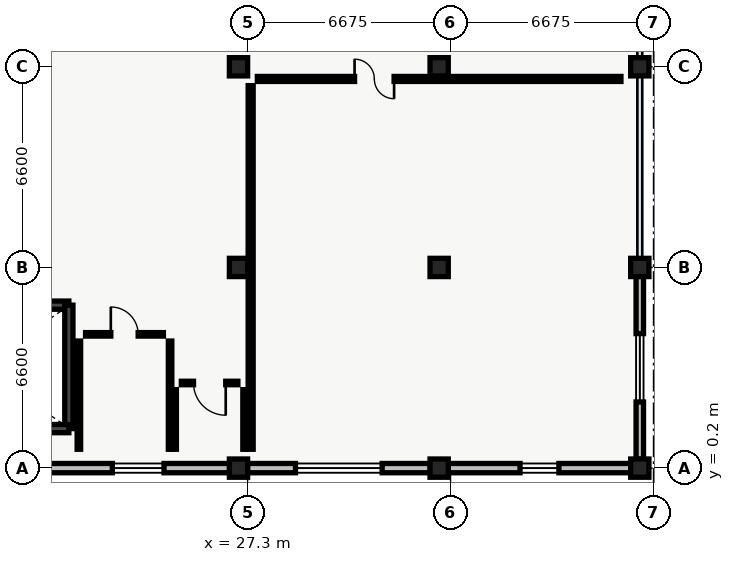
"""IFC4 building model, lengths in metres.
Left out: names, types, materials, properties, quantities, classifications, styles, units other than length and angle.
Written with IfcOpenShell. Run it as: python <this file> out.ifc"""

import sys

from ifc_helpers import new_model, si_unit, direction, frame, frame_2d, origin, origin_2d, place, context, subcontext, project, spatial, rectangle, extrude, element, fill, save


model = new_model("IFC4")
c1 = context("Model", 3, precision=1e-05, world=origin(), true_north=direction((0.0, 1.0)))
c2 = subcontext(c1, "Body", "Model", "MODEL_VIEW")
j1 = project(units=[si_unit("LENGTHUNIT", "METRE"), si_unit("PLANEANGLEUNIT", "RADIAN")], contexts=[c1])
p1 = place(None, origin())
s1 = spatial("IfcSite", under=j1, at=p1, CompositionType="ELEMENT")
p2 = place(p1, origin())
s2 = spatial("IfcBuilding", under=s1, at=p2, CompositionType="ELEMENT")
p3 = place(p2, frame((0.0, 0.0, 5.1)))
s3 = spatial("IfcBuildingStorey", under=s2, at=p3, CompositionType="ELEMENT", Elevation=5.1)
for number, where, z_axis, x_axis in (
    (1, (27.0, 0.2, 0.0), (0.0, 0.0, 1.0), (1.0, 0.0, 0.0)),
    (2, (27.0, 6.8, 0.0), (0.0, 0.0, 1.0), (1.0, 0.0, 0.0)),
    (3, (27.0, 13.4, 0.0), (0.0, 0.0, 1.0), (1.0, 0.0, 0.0)),
    (4, (33.6, 0.2, 0.0), (0.0, 0.0, 1.0), (1.0, 0.0, 0.0)),
    (5, (33.6, 6.8, 0.0), (0.0, 0.0, 1.0), (1.0, 0.0, 0.0)),
    (6, (33.6, 13.4, 0.0), (0.0, 0.0, 1.0), (1.0, 0.0, 0.0)),
    (7, (40.2, 0.2, 0.0), (0.0, 0.0, 1.0), (1.0, 0.0, 0.0)),
    (8, (40.2, 6.8, 0.0), (0.0, 0.0, 1.0), (1.0, 0.0, 0.0)),
    (9, (40.2, 13.4, 0.0), (0.0, 0.0, 1.0), (1.0, 0.0, 0.0)),
):
    element("IfcColumn", number, at=place(p3, frame(where, z_axis=z_axis, x_axis=x_axis)), inside=s3, PredefinedType="COLUMN", context=c2, shape_type="SweptSolid", body=[
        extrude(rectangle(XDim=0.6, YDim=0.6, at=origin_2d()), origin(), (0.0, 0.0, 1.0), 4.3),
    ])
p4 = place(p3, frame((40.2, 6.505, 0.0), z_axis=(0.0, 0.0, 1.0), x_axis=(0.0, -1.0, 0.0)))
e10 = element("IfcWall", 10, at=p4, inside=s3, PredefinedType="STANDARD", context=c2, shape_type="SweptSolid", body=[
    extrude(rectangle(XDim=6.01, YDim=0.245, at=frame_2d((3.005, 0.0))), origin(), (0.0, 0.0, 1.0), 3.785),
])
p5 = place(p4, frame((1.88, 0.0, 0.95)))
e11 = element("IfcOpeningElement", 11, at=p5, cuts=e10, PredefinedType="OPENING", context=c2, shape_type="SweptSolid", body=[
    extrude(rectangle(XDim=2.25, YDim=1.55, at=frame_2d((1.125, 0.775))), frame((0.0, 0.123, 0.0), z_axis=(0.0, -1.0, 0.0), x_axis=(1.0, 0.0, 0.0)), (0.0, 0.0, 1.0), 0.245),
])
p6 = place(p3, frame((39.905, 0.2, 0.0), z_axis=(0.0, 0.0, 1.0), x_axis=(-1.0, 0.0, 0.0)))
e12 = element("IfcWall", 12, at=p6, inside=s3, PredefinedType="STANDARD", context=c2, shape_type="SweptSolid", body=[
    extrude(rectangle(XDim=6.01, YDim=0.305, at=frame_2d((3.005, 0.0))), origin(), (0.0, 0.0, 1.0), 3.785),
])
p7 = place(p6, frame((2.365, 0.0, 0.95)))
e13 = element("IfcOpeningElement", 13, at=p7, cuts=e12, PredefinedType="OPENING", context=c2, shape_type="SweptSolid", body=[
    extrude(rectangle(XDim=1.28, YDim=1.42, at=frame_2d((0.64, 0.71))), frame((0.0, 0.152, 0.0), z_axis=(0.0, -1.0, 0.0), x_axis=(1.0, 0.0, 0.0)), (0.0, 0.0, 1.0), 0.305),
])
p8 = place(p3, frame((33.305, 0.2, 0.0), z_axis=(0.0, 0.0, 1.0), x_axis=(-1.0, 0.0, 0.0)))
e14 = element("IfcWall", 14, at=p8, inside=s3, PredefinedType="STANDARD", context=c2, shape_type="SweptSolid", body=[
    extrude(rectangle(XDim=6.01, YDim=0.305, at=frame_2d((3.005, 0.0))), origin(), (0.0, 0.0, 1.0), 3.785),
])
p9 = place(p8, frame((1.58, 0.0, 0.95)))
e15 = element("IfcOpeningElement", 15, at=p9, cuts=e14, PredefinedType="OPENING", context=c2, shape_type="SweptSolid", body=[
    extrude(rectangle(XDim=2.85, YDim=1.5, at=frame_2d((1.425, 0.75))), frame((0.0, 0.152, 0.0), z_axis=(0.0, -1.0, 0.0), x_axis=(1.0, 0.0, 0.0)), (0.0, 0.0, 1.0), 0.305),
])
p10 = place(p3, frame((26.705, 0.2, 0.0), z_axis=(0.0, 0.0, 1.0), x_axis=(-1.0, 0.0, 0.0)))
e16 = element("IfcWall", 16, at=p10, inside=s3, PredefinedType="STANDARD", context=c2, shape_type="SweptSolid", body=[
    extrude(rectangle(XDim=6.01, YDim=0.305, at=frame_2d((3.005, 0.0))), origin(), (0.0, 0.0, 1.0), 3.785),
])
p11 = place(p10, frame((2.155, 0.0, 0.95)))
e17 = element("IfcOpeningElement", 17, at=p11, cuts=e16, PredefinedType="OPENING", context=c2, shape_type="SweptSolid", body=[
    extrude(rectangle(XDim=1.7, YDim=1.55, at=frame_2d((0.85, 0.775))), frame((0.0, 0.152, 0.0), z_axis=(0.0, -1.0, 0.0), x_axis=(1.0, 0.0, 0.0)), (0.0, 0.0, 1.0), 0.305),
])
p12 = place(p3, frame((13.95, 5.56, 0.0), z_axis=(0.0, 0.0, 1.0), x_axis=(1.0, 0.0, 0.0)))
e18 = element("IfcWall", 18, at=p12, inside=s3, PredefinedType="SHEAR", context=c2, shape_type="SweptSolid", body=[
    extrude(rectangle(XDim=7.47, YDim=0.27, at=frame_2d((3.735, 0.0))), origin(), (0.0, 0.0, 1.0), 4.28),
])
p13 = place(p12, frame((0.18, 0.0, 0.0)))
e19 = element("IfcOpeningElement", 19, at=p13, cuts=e18, PredefinedType="OPENING", context=c2, shape_type="SweptSolid", body=[
    extrude(rectangle(XDim=1.08, YDim=2.15, at=frame_2d((0.54, 1.075))), frame((0.0, 0.135, 0.0), z_axis=(0.0, -1.0, 0.0), x_axis=(1.0, 0.0, 0.0)), (0.0, 0.0, 1.0), 0.27),
])
p14 = place(p3, frame((21.42, 5.56, 0.0), z_axis=(0.0, 0.0, 1.0), x_axis=(0.0, -1.0, 0.0)))
e20 = element("IfcWall", 20, at=p14, inside=s3, PredefinedType="SHEAR", context=c2, shape_type="SweptSolid", body=[
    extrude(rectangle(XDim=4.06, YDim=0.27, at=frame_2d((2.03, 0.0))), origin(), (0.0, 0.0, 1.0), 4.28),
])
p15 = place(p3, frame((21.42, 1.5, 0.0), z_axis=(0.0, 0.0, 1.0), x_axis=(-1.0, 0.0, 0.0)))
e21 = element("IfcWall", 21, at=p15, inside=s3, PredefinedType="SHEAR", context=c2, shape_type="SweptSolid", body=[
    extrude(rectangle(XDim=7.47, YDim=0.27, at=frame_2d((3.735, 0.0))), origin(), (0.0, 0.0, 1.0), 4.28),
])
p16 = place(p3, frame((24.75, 0.82, 0.0), z_axis=(0.0, 0.0, 1.0), x_axis=(0.0, 1.0, 0.0)))
e22 = element("IfcWall", 22, at=p16, inside=s3, PredefinedType="PARTITIONING", context=c2, shape_type="SweptSolid", body=[
    extrude(rectangle(XDim=3.56, YDim=0.115, at=frame_2d((1.78, 0.0))), origin(), (0.0, 0.0, 1.0), 3.95),
])
p17 = place(p3, frame((24.53, 4.6, 0.0), z_axis=(0.0, 0.0, 1.0), x_axis=(-1.0, 0.0, 0.0)))
e23 = element("IfcWall", 23, at=p17, inside=s3, PredefinedType="PARTITIONING", context=c2, shape_type="SweptSolid", body=[
    extrude(rectangle(XDim=2.56, YDim=0.115, at=frame_2d((1.28, 0.0))), origin(), (0.0, 0.0, 1.0), 3.95),
])
p18 = place(p17, frame((0.83, 0.0, 0.0)))
e24 = element("IfcOpeningElement", 24, at=p18, cuts=e23, PredefinedType="OPENING", context=c2, shape_type="SweptSolid", body=[
    extrude(rectangle(XDim=0.9, YDim=2.1, at=frame_2d((0.45, 1.05))), frame((0.0, 0.058, 0.0), z_axis=(0.0, -1.0, 0.0), x_axis=(1.0, 0.0, 0.0)), (0.0, 0.0, 1.0), 0.115),
])
p19 = place(p3, frame((21.75, 4.38, 0.0), z_axis=(0.0, 0.0, 1.0), x_axis=(0.0, -1.0, 0.0)))
e25 = element("IfcWall", 25, at=p19, inside=s3, PredefinedType="PARTITIONING", context=c2, shape_type="SweptSolid", body=[
    extrude(rectangle(XDim=3.56, YDim=0.115, at=frame_2d((1.78, 0.0))), origin(), (0.0, 0.0, 1.0), 3.95),
])
p20 = place(p3, frame((27.2, 0.82, 0.0), z_axis=(0.0, 0.0, 1.0), x_axis=(0.0, 1.0, 0.0)))
e26 = element("IfcWall", 26, at=p20, inside=s3, PredefinedType="PARTITIONING", context=c2, shape_type="SweptSolid", body=[
    extrude(rectangle(XDim=1.96, YDim=0.115, at=frame_2d((0.98, 0.0))), origin(), (0.0, 0.0, 1.0), 3.635),
])
p21 = place(p3, frame((26.98, 3.0, 0.0), z_axis=(0.0, 0.0, 1.0), x_axis=(-1.0, 0.0, 0.0)))
e27 = element("IfcWall", 27, at=p21, inside=s3, PredefinedType="PARTITIONING", context=c2, shape_type="SweptSolid", body=[
    extrude(rectangle(XDim=1.86, YDim=0.115, at=frame_2d((0.93, 0.0))), origin(), (0.0, 0.0, 1.0), 3.95),
])
p22 = place(p21, frame((0.4, 0.0, 0.0)))
e28 = element("IfcOpeningElement", 28, at=p22, cuts=e27, PredefinedType="OPENING", context=c2, shape_type="SweptSolid", body=[
    extrude(rectangle(XDim=1.06, YDim=2.12, at=frame_2d((0.53, 1.06))), frame((0.0, 0.058, 0.0), z_axis=(0.0, -1.0, 0.0), x_axis=(1.0, 0.0, 0.0)), (0.0, 0.0, 1.0), 0.115),
])
p23 = place(p3, frame((24.9, 2.78, 0.0), z_axis=(0.0, 0.0, 1.0), x_axis=(0.0, -1.0, 0.0)))
e29 = element("IfcWall", 29, at=p23, inside=s3, PredefinedType="PARTITIONING", context=c2, shape_type="SweptSolid", body=[
    extrude(rectangle(XDim=1.96, YDim=0.115, at=frame_2d((0.98, 0.0))), origin(), (0.0, 0.0, 1.0), 3.95),
])
p24 = place(p3, frame((39.58, 13.0, 0.0), z_axis=(0.0, 0.0, 1.0), x_axis=(-1.0, 0.0, 0.0)))
e30 = element("IfcWall", 30, at=p24, inside=s3, PredefinedType="PARTITIONING", context=c2, shape_type="SweptSolid", body=[
    extrude(rectangle(XDim=11.96, YDim=0.165, at=frame_2d((5.98, 0.0))), origin(), (0.0, 0.0, 1.0), 3.95),
])
p25 = place(p24, frame((7.462, 0.0, 0.0)))
e31 = element("IfcOpeningElement", 31, at=p25, cuts=e30, PredefinedType="OPENING", context=c2, shape_type="SweptSolid", body=[
    extrude(rectangle(XDim=1.3, YDim=2.18, at=frame_2d((0.65, 1.09))), frame((0.0, 0.083, 0.0), z_axis=(0.0, -1.0, 0.0), x_axis=(1.0, 0.0, 0.0)), (0.0, 0.0, 1.0), 0.165),
])
p26 = place(p3, frame((27.4, 12.78, 0.0), z_axis=(0.0, 0.0, 1.0), x_axis=(0.0, -1.0, 0.0)))
e32 = element("IfcWall", 32, at=p26, inside=s3, PredefinedType="PARTITIONING", context=c2, shape_type="SweptSolid", body=[
    extrude(rectangle(XDim=11.96, YDim=0.165, at=frame_2d((5.98, 0.0))), origin(), (0.0, 0.0, 1.0), 3.95),
])
p27 = place(p5, origin())
e33 = element("IfcWindow", 33, at=p27, inside=s3, PartitioningType="SINGLE_PANEL", PredefinedType="WINDOW", context=c2, shape_type="SweptSolid", body=[
    extrude(rectangle(XDim=2.25, YDim=1.55, at=frame_2d((1.125, 0.775))), frame((0.0, 0.03, 0.0), z_axis=(0.0, -1.0, 0.0), x_axis=(1.0, 0.0, 0.0)), (0.0, 0.0, 1.0), 0.06),
])
fill(e11, e33)
p28 = place(p7, origin())
e34 = element("IfcWindow", 34, at=p28, inside=s3, PartitioningType="SINGLE_PANEL", PredefinedType="WINDOW", context=c2, shape_type="SweptSolid", body=[
    extrude(rectangle(XDim=1.28, YDim=1.42, at=frame_2d((0.64, 0.71))), frame((0.0, 0.03, 0.0), z_axis=(0.0, -1.0, 0.0), x_axis=(1.0, 0.0, 0.0)), (0.0, 0.0, 1.0), 0.06),
])
fill(e13, e34)
p29 = place(p9, origin())
e35 = element("IfcWindow", 35, at=p29, inside=s3, PartitioningType="SINGLE_PANEL", PredefinedType="WINDOW", context=c2, shape_type="SweptSolid", body=[
    extrude(rectangle(XDim=2.85, YDim=1.5, at=frame_2d((1.425, 0.75))), frame((0.0, 0.03, 0.0), z_axis=(0.0, -1.0, 0.0), x_axis=(1.0, 0.0, 0.0)), (0.0, 0.0, 1.0), 0.06),
])
fill(e15, e35)
p30 = place(p11, origin())
e36 = element("IfcWindow", 36, at=p30, inside=s3, PartitioningType="SINGLE_PANEL", PredefinedType="WINDOW", context=c2, shape_type="SweptSolid", body=[
    extrude(rectangle(XDim=1.7, YDim=1.55, at=frame_2d((0.85, 0.775))), frame((0.0, 0.03, 0.0), z_axis=(0.0, -1.0, 0.0), x_axis=(1.0, 0.0, 0.0)), (0.0, 0.0, 1.0), 0.06),
])
fill(e17, e36)
p31 = place(p18, origin())
e37 = element("IfcDoor", 37, at=p31, inside=s3, OperationType="SINGLE_SWING_RIGHT", PredefinedType="DOOR", context=c2, shape_type="SweptSolid", body=[
    extrude(rectangle(XDim=0.9, YDim=2.1, at=frame_2d((0.45, 1.05))), frame((0.0, 0.025, 0.0), z_axis=(0.0, -1.0, 0.0), x_axis=(1.0, 0.0, 0.0)), (0.0, 0.0, 1.0), 0.05),
])
fill(e24, e37)
p32 = place(p22, origin())
e38 = element("IfcDoor", 38, at=p32, inside=s3, OperationType="SINGLE_SWING_LEFT", PredefinedType="DOOR", context=c2, shape_type="SweptSolid", body=[
    extrude(rectangle(XDim=1.06, YDim=2.12, at=frame_2d((0.53, 1.06))), frame((0.0, 0.025, 0.0), z_axis=(0.0, -1.0, 0.0), x_axis=(1.0, 0.0, 0.0)), (0.0, 0.0, 1.0), 0.05),
])
fill(e28, e38)
p33 = place(p25, origin())
e39 = element("IfcDoor", 39, at=p33, inside=s3, OperationType="DOUBLE_DOOR_SINGLE_SWING", PredefinedType="DOOR", context=c2, shape_type="SweptSolid", body=[
    extrude(rectangle(XDim=1.3, YDim=2.18, at=frame_2d((0.65, 1.09))), frame((0.0, 0.025, 0.0), z_axis=(0.0, -1.0, 0.0), x_axis=(1.0, 0.0, 0.0)), (0.0, 0.0, 1.0), 0.05),
])
fill(e31, e39)
save(model, sys.argv[1])
